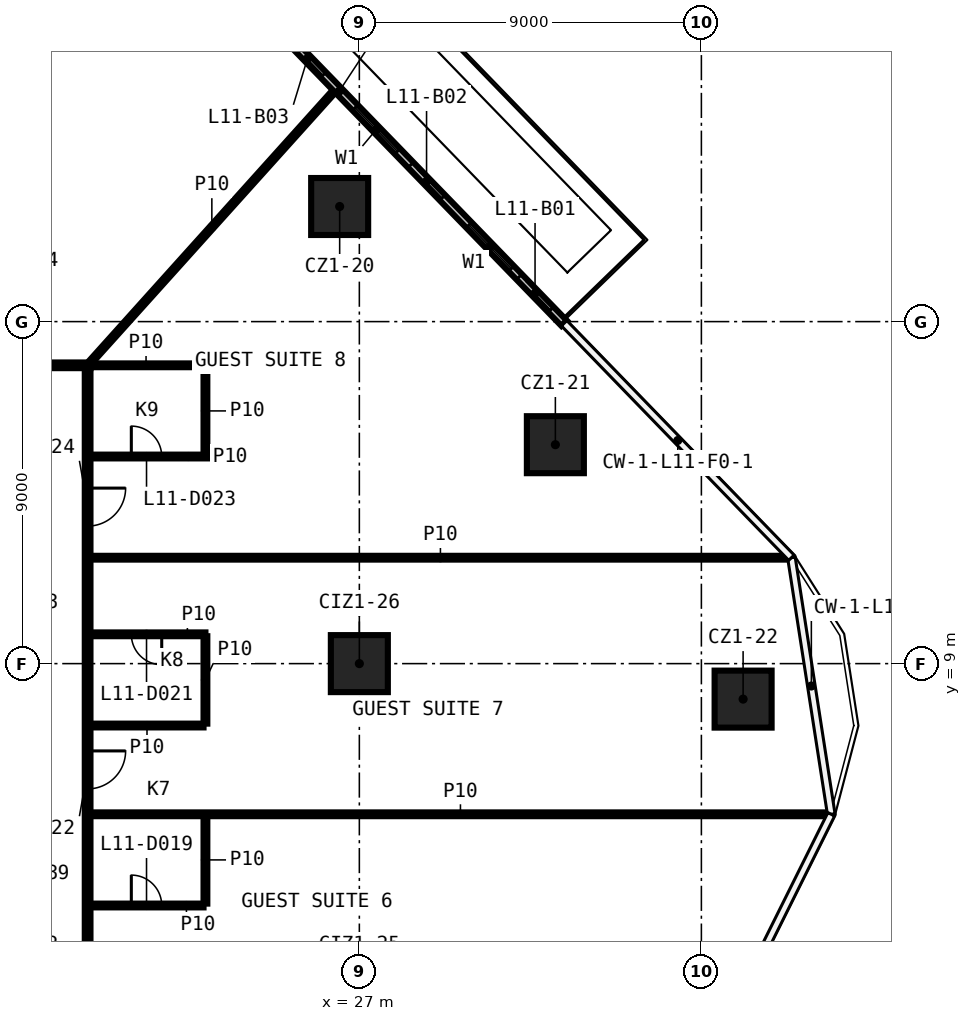
"""IFC4 building model, lengths in metres.
Left out: names, types, materials, properties, quantities, classifications, styles, units other than length and angle.
Written with IfcOpenShell. Run it as: python <this file> out.ifc"""

import sys

from ifc_helpers import new_model, si_unit, direction, frame, frame_2d, origin, origin_2d, place, context, subcontext, project, spatial, rectangle, extrude, element, fill, save


model = new_model("IFC4")
c1 = context("Model", 3, precision=1e-05, world=origin(), true_north=direction((0.0, 1.0)))
c2 = subcontext(c1, "Body", "Model", "MODEL_VIEW")
j1 = project(units=[si_unit("LENGTHUNIT", "METRE"), si_unit("PLANEANGLEUNIT", "RADIAN")], contexts=[c1])
p1 = place(None, origin())
s1 = spatial("IfcSite", under=j1, at=p1, CompositionType="ELEMENT")
p2 = place(p1, origin())
s2 = spatial("IfcBuilding", under=s1, at=p2, CompositionType="ELEMENT")
p3 = place(p2, frame((0.0, 0.0, 62.5)))
s3 = spatial("IfcBuildingStorey", under=s2, at=p3, CompositionType="ELEMENT", Elevation=62.5)
for number, where, z_axis, x_axis in (
    (1, (26.482, 21.029, 0.0), (0.0, 0.0, 1.0), (1.0, 0.0, 0.0)),
    (2, (32.158, 14.761, 0.0), (0.0, 0.0, 1.0), (1.0, 0.0, 0.0)),
    (3, (37.098, 8.066, 0.0), (0.0, 0.0, 1.0), (1.0, 0.0, 0.0)),
    (4, (27.0, 9.0, 0.0), (0.0, 0.0, 1.0), (1.0, 0.0, 0.0)),
):
    element("IfcColumn", number, at=place(p3, frame(where, z_axis=z_axis, x_axis=x_axis)), inside=s3, PredefinedType="COLUMN", context=c2, shape_type="SweptSolid", body=[
        extrude(rectangle(XDim=1.5, YDim=1.5, at=origin_2d()), origin(), (0.0, 0.0, 1.0), 3.3),
    ])
p4 = place(p3, frame((19.925, 2.635, 0.0), z_axis=(0.0, 0.0, 1.0), x_axis=(1.0, 0.0, 0.0)))
e5 = element("IfcWall", 5, at=p4, inside=s3, PredefinedType="PARTITIONING", context=c2, shape_type="SweptSolid", body=[
    extrude(rectangle(XDim=2.975, YDim=0.1, at=frame_2d((1.487, 0.0))), origin(), (0.0, 0.0, 1.0), 3.3),
])
p5 = place(p4, frame((1.075, 0.0, 0.0)))
e6 = element("IfcOpeningElement", 6, at=p5, cuts=e5, PredefinedType="OPENING", context=c2, shape_type="SweptSolid", body=[
    extrude(rectangle(XDim=0.8, YDim=2.1, at=frame_2d((0.4, 1.05))), frame((0.0, 0.06, 0.0), z_axis=(0.0, -1.0, 0.0), x_axis=(1.0, 0.0, 0.0)), (0.0, 0.0, 1.0), 0.12),
])
p6 = place(p3, frame((19.925, 5.035, 0.0), z_axis=(0.0, 0.0, 1.0), x_axis=(1.0, 0.0, 0.0)))
e7 = element("IfcWall", 7, at=p6, inside=s3, PredefinedType="PARTITIONING", context=c2, shape_type="SweptSolid", body=[
    extrude(rectangle(XDim=19.47, YDim=0.1, at=frame_2d((9.735, 0.0))), origin(), (0.0, 0.0, 1.0), 3.3),
])
p7 = place(p3, frame((19.925, 7.371, 0.0), z_axis=(0.0, 0.0, 1.0), x_axis=(1.0, 0.0, 0.0)))
e8 = element("IfcWall", 8, at=p7, inside=s3, PredefinedType="PARTITIONING", context=c2, shape_type="SweptSolid", body=[
    extrude(rectangle(XDim=2.975, YDim=0.1, at=frame_2d((1.487, 0.0))), origin(), (0.0, 0.0, 1.0), 3.3),
])
p8 = place(p3, frame((22.95, 9.771, 0.0), z_axis=(0.0, 0.0, 1.0), x_axis=(-1.0, 0.0, 0.0)))
e9 = element("IfcWall", 9, at=p8, inside=s3, PredefinedType="PARTITIONING", context=c2, shape_type="SweptSolid", body=[
    extrude(rectangle(XDim=3.025, YDim=0.1, at=frame_2d((1.512, 0.0))), origin(), (0.0, 0.0, 1.0), 3.3),
])
p9 = place(p8, frame((1.15, 0.0, 0.0)))
e10 = element("IfcOpeningElement", 10, at=p9, cuts=e9, PredefinedType="OPENING", context=c2, shape_type="SweptSolid", body=[
    extrude(rectangle(XDim=0.8, YDim=2.1, at=frame_2d((0.4, 1.05))), frame((0.0, 0.06, 0.0), z_axis=(0.0, -1.0, 0.0), x_axis=(1.0, 0.0, 0.0)), (0.0, 0.0, 1.0), 0.12),
])
p10 = place(p3, frame((19.925, 11.787, 0.0), z_axis=(0.0, 0.0, 1.0), x_axis=(1.0, 0.0, 0.0)))
e11 = element("IfcWall", 11, at=p10, inside=s3, PredefinedType="PARTITIONING", context=c2, shape_type="SweptSolid", body=[
    extrude(rectangle(XDim=18.417, YDim=0.1, at=frame_2d((9.208, 0.0))), origin(), (0.0, 0.0, 1.0), 3.3),
])
p11 = place(p3, frame((19.925, 14.45, 0.0), z_axis=(0.0, 0.0, 1.0), x_axis=(1.0, 0.0, 0.0)))
e12 = element("IfcWall", 12, at=p11, inside=s3, PredefinedType="PARTITIONING", context=c2, shape_type="SweptSolid", body=[
    extrude(rectangle(XDim=3.075, YDim=0.1, at=frame_2d((1.538, 0.0))), origin(), (0.0, 0.0, 1.0), 3.3),
])
p12 = place(p11, frame((1.075, 0.0, 0.0)))
e13 = element("IfcOpeningElement", 13, at=p12, cuts=e12, PredefinedType="OPENING", context=c2, shape_type="SweptSolid", body=[
    extrude(rectangle(XDim=0.8, YDim=2.1, at=frame_2d((0.4, 1.05))), frame((0.0, 0.06, 0.0), z_axis=(0.0, -1.0, 0.0), x_axis=(1.0, 0.0, 0.0)), (0.0, 0.0, 1.0), 0.12),
])
p13 = place(p3, frame((-19.925, 16.85, 0.0), z_axis=(0.0, 0.0, 1.0), x_axis=(1.0, 0.0, 0.0)))
e14 = element("IfcWall", 14, at=p13, inside=s3, PredefinedType="PARTITIONING", context=c2, shape_type="SweptSolid", body=[
    extrude(rectangle(XDim=39.85, YDim=0.15, at=frame_2d((19.925, 0.0))), origin(), (0.0, 0.0, 1.0), 3.3),
])
p14 = place(p13, frame((31.433, 0.0, 0.0)))
e15 = element("IfcOpeningElement", 15, at=p14, cuts=e14, PredefinedType="OPENING", context=c2, shape_type="SweptSolid", body=[
    extrude(rectangle(XDim=0.9, YDim=2.1, at=frame_2d((0.45, 1.05))), frame((0.0, 0.085, 0.0), z_axis=(0.0, -1.0, 0.0), x_axis=(1.0, 0.0, 0.0)), (0.0, 0.0, 1.0), 0.17),
])
p15 = place(p13, frame((22.043, 0.0, 0.0)))
e16 = element("IfcOpeningElement", 16, at=p15, cuts=e14, PredefinedType="OPENING", context=c2, shape_type="SweptSolid", body=[
    extrude(rectangle(XDim=0.9, YDim=2.1, at=frame_2d((0.45, 1.05))), frame((0.0, 0.085, 0.0), z_axis=(0.0, -1.0, 0.0), x_axis=(1.0, 0.0, 0.0)), (0.0, 0.0, 1.0), 0.17),
])
p16 = place(p13, frame((16.957, 0.0, 0.0)))
e17 = element("IfcOpeningElement", 17, at=p16, cuts=e14, PredefinedType="OPENING", context=c2, shape_type="SweptSolid", body=[
    extrude(rectangle(XDim=0.9, YDim=2.1, at=frame_2d((0.45, 1.05))), frame((0.0, 0.085, 0.0), z_axis=(0.0, -1.0, 0.0), x_axis=(1.0, 0.0, 0.0)), (0.0, 0.0, 1.0), 0.17),
])
p17 = place(p13, frame((13.572, 0.0, 0.0)))
e18 = element("IfcOpeningElement", 18, at=p17, cuts=e14, PredefinedType="OPENING", context=c2, shape_type="SweptSolid", body=[
    extrude(rectangle(XDim=0.9, YDim=2.1, at=frame_2d((0.45, 1.05))), frame((0.0, 0.085, 0.0), z_axis=(0.0, -1.0, 0.0), x_axis=(1.0, 0.0, 0.0)), (0.0, 0.0, 1.0), 0.17),
])
p18 = place(p13, frame((7.458, 0.0, 0.0)))
e19 = element("IfcOpeningElement", 19, at=p18, cuts=e14, PredefinedType="OPENING", context=c2, shape_type="SweptSolid", body=[
    extrude(rectangle(XDim=1.0, YDim=2.1, at=frame_2d((0.5, 1.05))), frame((0.0, 0.085, 0.0), z_axis=(0.0, -1.0, 0.0), x_axis=(1.0, 0.0, 0.0)), (0.0, 0.0, 1.0), 0.17),
])
p19 = place(p3, frame((19.775, 16.85, 0.0), z_axis=(0.0, 0.0, 1.0), x_axis=(1.0, 0.0, 0.0)))
e20 = element("IfcWall", 20, at=p19, inside=s3, PredefinedType="PARTITIONING", context=c2, shape_type="SweptSolid", body=[
    extrude(rectangle(XDim=3.225, YDim=0.1, at=frame_2d((1.613, 0.0))), origin(), (0.0, 0.0, 1.0), 3.3),
])
p20 = place(p3, frame((19.85, 16.85, 0.0), z_axis=(0.0, 0.0, 1.0), x_axis=(0.668734291705, 0.743501477536, 0.0)))
e21 = element("IfcWall", 21, at=p20, inside=s3, PredefinedType="PARTITIONING", context=c2, shape_type="SweptSolid", body=[
    extrude(rectangle(XDim=9.776, YDim=0.1, at=frame_2d((4.888, 0.0))), origin(), (0.0, 0.0, 1.0), 3.3),
])
for number, where, z_axis, x_axis in (
    (22, (22.95, 2.685, 0.0), (0.0, 0.0, 1.0), (0.0, 1.0, 0.0)),
    (23, (22.95, 7.421, 0.0), (0.0, 0.0, 1.0), (0.0, 1.0, 0.0)),
):
    element("IfcWall", number, at=place(p3, frame(where, z_axis=z_axis, x_axis=x_axis)), inside=s3, PredefinedType="PARTITIONING", context=c2, shape_type="SweptSolid", body=[
        extrude(rectangle(XDim=2.3, YDim=0.1, at=frame_2d((1.15, 0.0))), origin(), (0.0, 0.0, 1.0), 3.3),
    ])
p21 = place(p3, frame((22.95, 14.5, 0.0), z_axis=(0.0, 0.0, 1.0), x_axis=(0.0, 1.0, 0.0)))
e24 = element("IfcWall", 24, at=p21, inside=s3, PredefinedType="PARTITIONING", context=c2, shape_type="SweptSolid", body=[
    extrude(rectangle(XDim=2.3, YDim=0.1, at=frame_2d((1.15, 0.0))), origin(), (0.0, 0.0, 1.0), 3.3),
])
p22 = place(p3, frame((19.85, 16.775, 0.0), z_axis=(0.0, 0.0, 1.0), x_axis=(0.0, -1.0, 0.0)))
e25 = element("IfcWall", 25, at=p22, inside=s3, PredefinedType="PARTITIONING", context=c2, shape_type="SweptSolid", body=[
    extrude(rectangle(XDim=33.55, YDim=0.15, at=frame_2d((16.775, 0.0))), origin(), (0.0, 0.0, 1.0), 3.3),
])
p23 = place(p22, frame((32.158, 0.0, 0.0)))
e26 = element("IfcOpeningElement", 26, at=p23, cuts=e25, PredefinedType="OPENING", context=c2, shape_type="SweptSolid", body=[
    extrude(rectangle(XDim=1.0, YDim=2.1, at=frame_2d((0.5, 1.05))), frame((0.0, 0.085, 0.0), z_axis=(0.0, -1.0, 0.0), x_axis=(1.0, 0.0, 0.0)), (0.0, 0.0, 1.0), 0.17),
])
p24 = place(p22, frame((20.094, 0.0, 0.0)))
e27 = element("IfcOpeningElement", 27, at=p24, cuts=e25, PredefinedType="OPENING", context=c2, shape_type="SweptSolid", body=[
    extrude(rectangle(XDim=1.0, YDim=2.1, at=frame_2d((0.5, 1.05))), frame((0.0, 0.085, 0.0), z_axis=(0.0, -1.0, 0.0), x_axis=(1.0, 0.0, 0.0)), (0.0, 0.0, 1.0), 0.17),
])
p25 = place(p22, frame((18.428, 0.0, 0.0)))
e28 = element("IfcOpeningElement", 28, at=p25, cuts=e25, PredefinedType="OPENING", context=c2, shape_type="SweptSolid", body=[
    extrude(rectangle(XDim=1.0, YDim=2.1, at=frame_2d((0.5, 1.05))), frame((0.0, 0.085, 0.0), z_axis=(0.0, -1.0, 0.0), x_axis=(1.0, 0.0, 0.0)), (0.0, 0.0, 1.0), 0.17),
])
p26 = place(p22, frame((10.072, 0.0, 0.0)))
e29 = element("IfcOpeningElement", 29, at=p26, cuts=e25, PredefinedType="OPENING", context=c2, shape_type="SweptSolid", body=[
    extrude(rectangle(XDim=1.0, YDim=2.1, at=frame_2d((0.5, 1.05))), frame((0.0, 0.085, 0.0), z_axis=(0.0, -1.0, 0.0), x_axis=(1.0, 0.0, 0.0)), (0.0, 0.0, 1.0), 0.17),
])
p27 = place(p22, frame((3.156, 0.0, 0.0)))
e30 = element("IfcOpeningElement", 30, at=p27, cuts=e25, PredefinedType="OPENING", context=c2, shape_type="SweptSolid", body=[
    extrude(rectangle(XDim=1.0, YDim=2.1, at=frame_2d((0.5, 1.05))), frame((0.0, 0.085, 0.0), z_axis=(0.0, -1.0, 0.0), x_axis=(1.0, 0.0, 0.0)), (0.0, 0.0, 1.0), 0.17),
])
p28 = place(p3, frame((32.389, 17.957, 0.0), z_axis=(0.0, 0.0, 1.0), x_axis=(-0.696038792441, 0.718004177855, 0.0)))
e31 = element("IfcWall", 31, at=p28, inside=s3, PredefinedType="SOLIDWALL", context=c2, shape_type="SweptSolid", body=[
    extrude(rectangle(XDim=17.206, YDim=0.2, at=frame_2d((8.603, 0.0))), origin(), (0.0, 0.0, 1.0), 3.3),
])
p29 = place(p28, frame((2.0, 0.0, 0.6)))
e32 = element("IfcOpeningElement", 32, at=p29, cuts=e31, PredefinedType="OPENING", context=c2, shape_type="SweptSolid", body=[
    extrude(rectangle(XDim=1.6, YDim=2.4, at=frame_2d((0.8, 1.2))), frame((0.0, 0.11, 0.0), z_axis=(0.0, -1.0, 0.0), x_axis=(1.0, 0.0, 0.0)), (0.0, 0.0, 1.0), 0.22),
])
p30 = place(p28, frame((0.5, 0.0, 0.0)))
e33 = element("IfcOpeningElement", 33, at=p30, cuts=e31, PredefinedType="OPENING", context=c2, shape_type="SweptSolid", body=[
    extrude(rectangle(XDim=1.2, YDim=2.4, at=frame_2d((0.6, 1.2))), frame((0.0, 0.11, 0.0), z_axis=(0.0, -1.0, 0.0), x_axis=(1.0, 0.0, 0.0)), (0.0, 0.0, 1.0), 0.22),
])
p31 = place(p28, frame((6.302, 0.0, 0.6)))
e34 = element("IfcOpeningElement", 34, at=p31, cuts=e31, PredefinedType="OPENING", context=c2, shape_type="SweptSolid", body=[
    extrude(rectangle(XDim=1.6, YDim=2.4, at=frame_2d((0.8, 1.2))), frame((0.0, 0.11, 0.0), z_axis=(0.0, -1.0, 0.0), x_axis=(1.0, 0.0, 0.0)), (0.0, 0.0, 1.0), 0.22),
])
p32 = place(p28, frame((4.601, 0.0, 0.0)))
e35 = element("IfcOpeningElement", 35, at=p32, cuts=e31, PredefinedType="OPENING", context=c2, shape_type="SweptSolid", body=[
    extrude(rectangle(XDim=1.2, YDim=2.4, at=frame_2d((0.6, 1.2))), frame((0.0, 0.11, 0.0), z_axis=(0.0, -1.0, 0.0), x_axis=(1.0, 0.0, 0.0)), (0.0, 0.0, 1.0), 0.22),
])
p33 = place(p28, frame((10.603, 0.0, 0.6)))
e36 = element("IfcOpeningElement", 36, at=p33, cuts=e31, PredefinedType="OPENING", context=c2, shape_type="SweptSolid", body=[
    extrude(rectangle(XDim=1.6, YDim=2.4, at=frame_2d((0.8, 1.2))), frame((0.0, 0.11, 0.0), z_axis=(0.0, -1.0, 0.0), x_axis=(1.0, 0.0, 0.0)), (0.0, 0.0, 1.0), 0.22),
])
p34 = place(p28, frame((9.103, 0.0, 0.0)))
e37 = element("IfcOpeningElement", 37, at=p34, cuts=e31, PredefinedType="OPENING", context=c2, shape_type="SweptSolid", body=[
    extrude(rectangle(XDim=1.2, YDim=2.4, at=frame_2d((0.6, 1.2))), frame((0.0, 0.11, 0.0), z_axis=(0.0, -1.0, 0.0), x_axis=(1.0, 0.0, 0.0)), (0.0, 0.0, 1.0), 0.22),
])
p35 = place(p28, frame((13.404, 0.0, 0.6)))
e38 = element("IfcOpeningElement", 38, at=p35, cuts=e31, PredefinedType="OPENING", context=c2, shape_type="SweptSolid", body=[
    extrude(rectangle(XDim=1.6, YDim=2.4, at=frame_2d((0.8, 1.2))), frame((0.0, 0.11, 0.0), z_axis=(0.0, -1.0, 0.0), x_axis=(1.0, 0.0, 0.0)), (0.0, 0.0, 1.0), 0.22),
])
p36 = place(p28, frame((15.504, 0.0, 0.0)))
e39 = element("IfcOpeningElement", 39, at=p36, cuts=e31, PredefinedType="OPENING", context=c2, shape_type="SweptSolid", body=[
    extrude(rectangle(XDim=1.2, YDim=2.4, at=frame_2d((0.6, 1.2))), frame((0.0, 0.11, 0.0), z_axis=(0.0, -1.0, 0.0), x_axis=(1.0, 0.0, 0.0)), (0.0, 0.0, 1.0), 0.22),
])
p37 = place(p5, origin())
e40 = element("IfcDoor", 40, at=p37, inside=s3, OperationType="SINGLE_SWING_RIGHT", PredefinedType="DOOR", context=c2, shape_type="SweptSolid", body=[
    extrude(rectangle(XDim=0.8, YDim=2.1, at=frame_2d((0.4, 1.05))), frame((0.0, 0.025, 0.0), z_axis=(0.0, -1.0, 0.0), x_axis=(1.0, 0.0, 0.0)), (0.0, 0.0, 1.0), 0.05),
])
fill(e6, e40)
p38 = place(p9, origin())
e41 = element("IfcDoor", 41, at=p38, inside=s3, OperationType="SINGLE_SWING_LEFT", PredefinedType="DOOR", context=c2, shape_type="SweptSolid", body=[
    extrude(rectangle(XDim=0.8, YDim=2.1, at=frame_2d((0.4, 1.05))), frame((0.0, 0.025, 0.0), z_axis=(0.0, -1.0, 0.0), x_axis=(1.0, 0.0, 0.0)), (0.0, 0.0, 1.0), 0.05),
])
fill(e10, e41)
p39 = place(p26, origin())
e42 = element("IfcDoor", 42, at=p39, inside=s3, OperationType="SINGLE_SWING_RIGHT", PredefinedType="DOOR", context=c2, shape_type="SweptSolid", body=[
    extrude(rectangle(XDim=1.0, YDim=2.1, at=frame_2d((0.5, 1.05))), frame((0.0, 0.025, 0.0), z_axis=(0.0, -1.0, 0.0), x_axis=(1.0, 0.0, 0.0)), (0.0, 0.0, 1.0), 0.05),
])
fill(e29, e42)
p40 = place(p12, origin())
e43 = element("IfcDoor", 43, at=p40, inside=s3, OperationType="SINGLE_SWING_RIGHT", PredefinedType="DOOR", context=c2, shape_type="SweptSolid", body=[
    extrude(rectangle(XDim=0.8, YDim=2.1, at=frame_2d((0.4, 1.05))), frame((0.0, 0.025, 0.0), z_axis=(0.0, -1.0, 0.0), x_axis=(1.0, 0.0, 0.0)), (0.0, 0.0, 1.0), 0.05),
])
fill(e13, e43)
p41 = place(p27, origin())
e44 = element("IfcDoor", 44, at=p41, inside=s3, OperationType="SINGLE_SWING_LEFT", PredefinedType="DOOR", context=c2, shape_type="SweptSolid", body=[
    extrude(rectangle(XDim=1.0, YDim=2.1, at=frame_2d((0.5, 1.05))), frame((0.0, 0.025, 0.0), z_axis=(0.0, -1.0, 0.0), x_axis=(1.0, 0.0, 0.0)), (0.0, 0.0, 1.0), 0.05),
])
fill(e30, e44)
p42 = place(p29, origin())
e45 = element("IfcWindow", 45, at=p42, inside=s3, PartitioningType="SINGLE_PANEL", PredefinedType="WINDOW", context=c2, shape_type="SweptSolid", body=[
    extrude(rectangle(XDim=1.6, YDim=2.4, at=frame_2d((0.8, 1.2))), frame((0.0, 0.03, 0.0), z_axis=(0.0, -1.0, 0.0), x_axis=(1.0, 0.0, 0.0)), (0.0, 0.0, 1.0), 0.06),
])
fill(e32, e45)
p43 = place(p30, origin())
e46 = element("IfcDoor", 46, at=p43, inside=s3, OperationType="SLIDING_TO_LEFT", PredefinedType="DOOR", context=c2, shape_type="SweptSolid", body=[
    extrude(rectangle(XDim=1.2, YDim=2.4, at=frame_2d((0.6, 1.2))), frame((0.0, 0.025, 0.0), z_axis=(0.0, -1.0, 0.0), x_axis=(1.0, 0.0, 0.0)), (0.0, 0.0, 1.0), 0.05),
])
fill(e33, e46)
p44 = place(p31, origin())
e47 = element("IfcWindow", 47, at=p44, inside=s3, PartitioningType="SINGLE_PANEL", PredefinedType="WINDOW", context=c2, shape_type="SweptSolid", body=[
    extrude(rectangle(XDim=1.6, YDim=2.4, at=frame_2d((0.8, 1.2))), frame((0.0, 0.03, 0.0), z_axis=(0.0, -1.0, 0.0), x_axis=(1.0, 0.0, 0.0)), (0.0, 0.0, 1.0), 0.06),
])
fill(e34, e47)
p45 = place(p32, origin())
e48 = element("IfcDoor", 48, at=p45, inside=s3, OperationType="SLIDING_TO_LEFT", PredefinedType="DOOR", context=c2, shape_type="SweptSolid", body=[
    extrude(rectangle(XDim=1.2, YDim=2.4, at=frame_2d((0.6, 1.2))), frame((0.0, 0.025, 0.0), z_axis=(0.0, -1.0, 0.0), x_axis=(1.0, 0.0, 0.0)), (0.0, 0.0, 1.0), 0.05),
])
fill(e35, e48)
p46 = place(p34, origin())
e49 = element("IfcDoor", 49, at=p46, inside=s3, OperationType="SLIDING_TO_LEFT", PredefinedType="DOOR", context=c2, shape_type="SweptSolid", body=[
    extrude(rectangle(XDim=1.2, YDim=2.4, at=frame_2d((0.6, 1.2))), frame((0.0, 0.025, 0.0), z_axis=(0.0, -1.0, 0.0), x_axis=(1.0, 0.0, 0.0)), (0.0, 0.0, 1.0), 0.05),
])
fill(e37, e49)
save(model, sys.argv[1])
